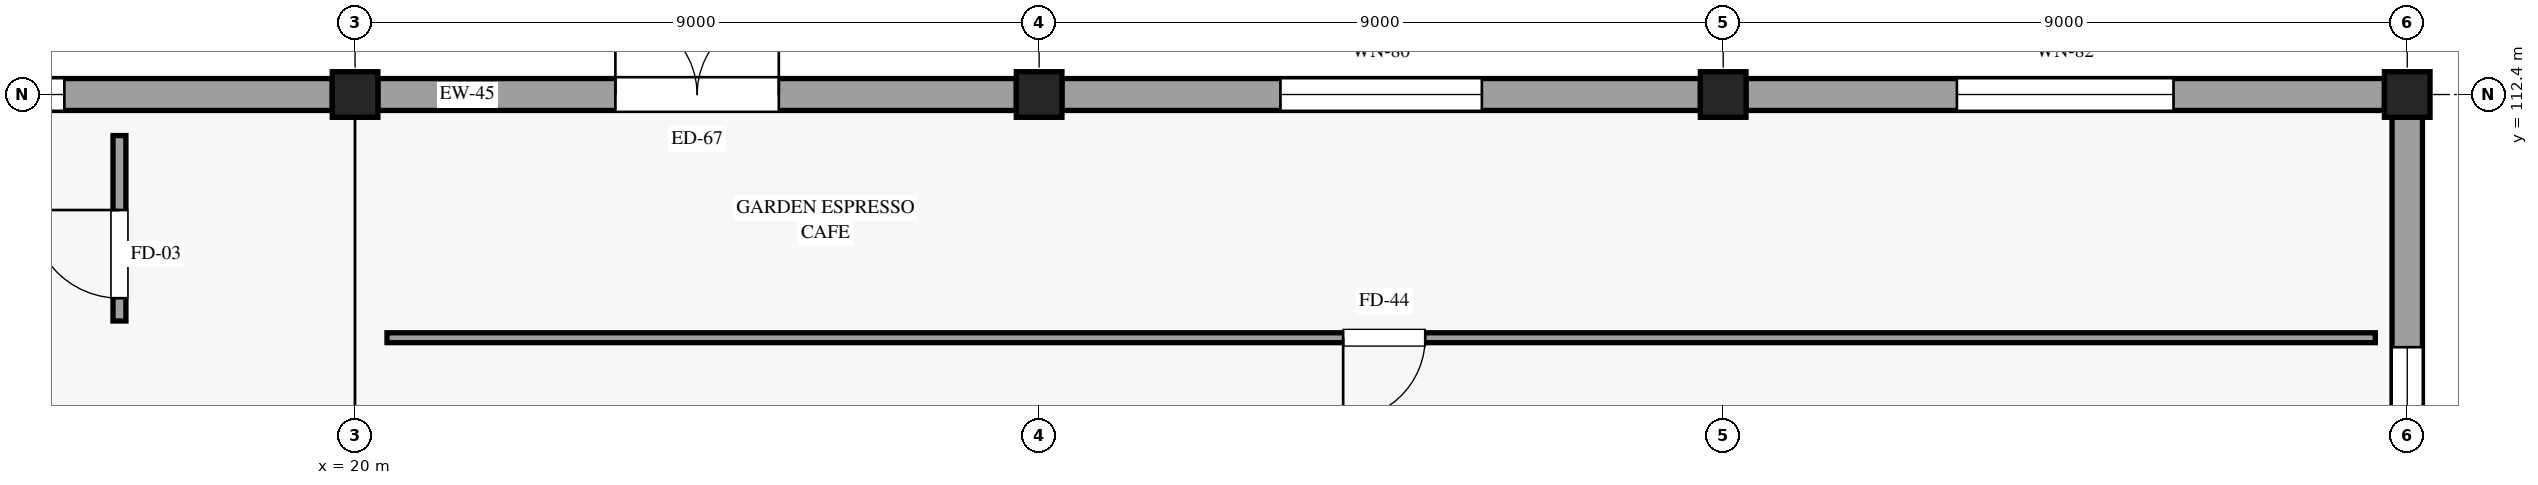
"""IFC4 building model, lengths in metres.
Left out: names, types, materials, properties, quantities, classifications, styles, units other than length and angle.
Written with IfcOpenShell. Run it as: python <this file> out.ifc"""

import sys

from ifc_helpers import new_model, si_unit, direction, frame, frame_2d, origin, origin_2d, place, context, subcontext, project, spatial, rectangle, extrude, element, fill, save


model = new_model("IFC4")
c1 = context("Model", 3, precision=1e-05, world=origin(), true_north=direction((0.0, 1.0)))
c2 = subcontext(c1, "Body", "Model", "MODEL_VIEW")
j1 = project(units=[si_unit("LENGTHUNIT", "METRE"), si_unit("PLANEANGLEUNIT", "RADIAN")], contexts=[c1])
p1 = place(None, origin())
s1 = spatial("IfcSite", under=j1, at=p1, CompositionType="ELEMENT")
p2 = place(p1, origin())
s2 = spatial("IfcBuilding", under=s1, at=p2, CompositionType="ELEMENT")
p3 = place(p2, origin())
s3 = spatial("IfcBuildingStorey", under=s2, at=p3, CompositionType="ELEMENT", Elevation=0.0)
for number, where, z_axis, x_axis in (
    (1, (20.0, 112.4, 0.0), (0.0, 0.0, 1.0), (1.0, 0.0, 0.0)),
    (2, (29.0, 112.4, 0.0), (0.0, 0.0, 1.0), (1.0, 0.0, 0.0)),
    (3, (38.0, 112.4, 0.0), (0.0, 0.0, 1.0), (1.0, 0.0, 0.0)),
    (4, (47.0, 112.4, 0.0), (0.0, 0.0, 1.0), (1.0, 0.0, 0.0)),
):
    element("IfcColumn", number, at=place(p3, frame(where, z_axis=z_axis, x_axis=x_axis)), inside=s3, PredefinedType="COLUMN", context=c2, shape_type="SweptSolid", body=[
        extrude(rectangle(XDim=0.6, YDim=0.6, at=origin_2d()), origin(), (0.0, 0.0, 1.0), 5.4),
    ])
p4 = place(p3, frame((11.3, 112.4, 0.0), z_axis=(0.0, 0.0, 1.0), x_axis=(1.0, 0.0, 0.0)))
e5 = element("IfcWall", 5, at=p4, inside=s3, PredefinedType="STANDARD", context=c2, shape_type="SweptSolid", body=[
    extrude(rectangle(XDim=8.4, YDim=0.42, at=frame_2d((4.2, 0.0))), origin(), (0.0, 0.0, 1.0), 4.605),
])
p5 = place(p4, frame((3.525, 0.0, 0.85)))
e6 = element("IfcOpeningElement", 6, at=p5, cuts=e5, PredefinedType="OPENING", context=c2, shape_type="SweptSolid", body=[
    extrude(rectangle(XDim=1.35, YDim=1.75, at=frame_2d((0.675, 0.875))), frame((0.0, 0.22, 0.0), z_axis=(0.0, -1.0, 0.0), x_axis=(1.0, 0.0, 0.0)), (0.0, 0.0, 1.0), 0.44),
])
p6 = place(p3, frame((20.3, 112.4, 0.0), z_axis=(0.0, 0.0, 1.0), x_axis=(1.0, 0.0, 0.0)))
e7 = element("IfcWall", 7, at=p6, inside=s3, PredefinedType="STANDARD", context=c2, shape_type="SweptSolid", body=[
    extrude(rectangle(XDim=8.4, YDim=0.42, at=frame_2d((4.2, 0.0))), origin(), (0.0, 0.0, 1.0), 4.605),
])
p7 = place(p6, frame((3.125, 0.0, 0.0)))
e8 = element("IfcOpeningElement", 8, at=p7, cuts=e7, PredefinedType="OPENING", context=c2, shape_type="SweptSolid", body=[
    extrude(rectangle(XDim=2.15, YDim=2.45, at=frame_2d((1.075, 1.225))), frame((0.0, 0.22, 0.0), z_axis=(0.0, -1.0, 0.0), x_axis=(1.0, 0.0, 0.0)), (0.0, 0.0, 1.0), 0.44),
])
p8 = place(p3, frame((29.3, 112.4, 0.0), z_axis=(0.0, 0.0, 1.0), x_axis=(1.0, 0.0, 0.0)))
e9 = element("IfcWall", 9, at=p8, inside=s3, PredefinedType="STANDARD", context=c2, shape_type="SweptSolid", body=[
    extrude(rectangle(XDim=8.4, YDim=0.42, at=frame_2d((4.2, 0.0))), origin(), (0.0, 0.0, 1.0), 4.605),
])
p9 = place(p8, frame((2.875, 0.0, 0.85)))
e10 = element("IfcOpeningElement", 10, at=p9, cuts=e9, PredefinedType="OPENING", context=c2, shape_type="SweptSolid", body=[
    extrude(rectangle(XDim=2.65, YDim=2.45, at=frame_2d((1.325, 1.225))), frame((0.0, 0.22, 0.0), z_axis=(0.0, -1.0, 0.0), x_axis=(1.0, 0.0, 0.0)), (0.0, 0.0, 1.0), 0.44),
])
p10 = place(p3, frame((38.3, 112.4, 0.0), z_axis=(0.0, 0.0, 1.0), x_axis=(1.0, 0.0, 0.0)))
e11 = element("IfcWall", 11, at=p10, inside=s3, PredefinedType="STANDARD", context=c2, shape_type="SweptSolid", body=[
    extrude(rectangle(XDim=8.4, YDim=0.42, at=frame_2d((4.2, 0.0))), origin(), (0.0, 0.0, 1.0), 4.605),
])
p11 = place(p10, frame((2.775, 0.0, 0.85)))
e12 = element("IfcOpeningElement", 12, at=p11, cuts=e11, PredefinedType="OPENING", context=c2, shape_type="SweptSolid", body=[
    extrude(rectangle(XDim=2.85, YDim=2.5, at=frame_2d((1.425, 1.25))), frame((0.0, 0.22, 0.0), z_axis=(0.0, -1.0, 0.0), x_axis=(1.0, 0.0, 0.0)), (0.0, 0.0, 1.0), 0.44),
])
p12 = place(p3, frame((47.0, 103.1, 0.0), z_axis=(0.0, 0.0, 1.0), x_axis=(0.0, 1.0, 0.0)))
e13 = element("IfcWall", 13, at=p12, inside=s3, PredefinedType="STANDARD", context=c2, shape_type="SweptSolid", body=[
    extrude(rectangle(XDim=9.0, YDim=0.4, at=frame_2d((4.5, 0.0))), origin(), (0.0, 0.0, 1.0), 4.605),
])
p13 = place(p12, frame((5.975, 0.0, 0.85), z_axis=(0.0, 0.0, 1.0), x_axis=(-1.0, 0.0, 0.0)))
e14 = element("IfcOpeningElement", 14, at=p13, cuts=e13, PredefinedType="OPENING", context=c2, shape_type="SweptSolid", body=[
    extrude(rectangle(XDim=2.95, YDim=2.5, at=frame_2d((1.475, 1.25))), frame((0.0, 0.21, 0.0), z_axis=(0.0, -1.0, 0.0), x_axis=(1.0, 0.0, 0.0)), (0.0, 0.0, 1.0), 0.42),
])
p14 = place(p3, frame((20.42, 109.2, 0.0), z_axis=(0.0, 0.0, 1.0), x_axis=(1.0, 0.0, 0.0)))
e15 = element("IfcWall", 15, at=p14, inside=s3, PredefinedType="PARTITIONING", context=c2, shape_type="SweptSolid", body=[
    extrude(rectangle(XDim=26.16, YDim=0.13, at=frame_2d((13.08, 0.0))), origin(), (0.0, 0.0, 1.0), 4.605),
])
p15 = place(p14, frame((13.66, 0.0, 0.0), z_axis=(0.0, 0.0, 1.0), x_axis=(-1.0, 0.0, 0.0)))
e16 = element("IfcOpeningElement", 16, at=p15, cuts=e15, PredefinedType="OPENING", context=c2, shape_type="SweptSolid", body=[
    extrude(rectangle(XDim=1.08, YDim=2.24, at=frame_2d((0.54, 1.12))), frame((0.0, 0.075, 0.0), z_axis=(0.0, -1.0, 0.0), x_axis=(1.0, 0.0, 0.0)), (0.0, 0.0, 1.0), 0.15),
])
p16 = place(p3, frame((16.9, 109.42, 0.0), z_axis=(0.0, 0.0, 1.0), x_axis=(0.0, 1.0, 0.0)))
e17 = element("IfcWall", 17, at=p16, inside=s3, PredefinedType="PARTITIONING", context=c2, shape_type="SweptSolid", body=[
    extrude(rectangle(XDim=2.44, YDim=0.17, at=frame_2d((1.22, 0.0))), origin(), (0.0, 0.0, 1.0), 4.745),
])
p17 = place(p16, frame((0.3, 0.0, 0.0)))
e18 = element("IfcOpeningElement", 18, at=p17, cuts=e17, PredefinedType="OPENING", context=c2, shape_type="SweptSolid", body=[
    extrude(rectangle(XDim=1.16, YDim=2.28, at=frame_2d((0.58, 1.14))), frame((0.0, 0.095, 0.0), z_axis=(0.0, -1.0, 0.0), x_axis=(1.0, 0.0, 0.0)), (0.0, 0.0, 1.0), 0.19),
])
p18 = place(p5, origin())
e19 = element("IfcWindow", 19, at=p18, inside=s3, PartitioningType="SINGLE_PANEL", PredefinedType="WINDOW", context=c2, shape_type="SweptSolid", body=[
    extrude(rectangle(XDim=1.35, YDim=1.75, at=frame_2d((0.675, 0.875))), frame((0.0, 0.03, 0.0), z_axis=(0.0, -1.0, 0.0), x_axis=(1.0, 0.0, 0.0)), (0.0, 0.0, 1.0), 0.06),
])
fill(e6, e19)
p19 = place(p7, origin())
e20 = element("IfcDoor", 20, at=p19, inside=s3, OperationType="DOUBLE_DOOR_SINGLE_SWING", PredefinedType="DOOR", context=c2, shape_type="SweptSolid", body=[
    extrude(rectangle(XDim=2.15, YDim=2.45, at=frame_2d((1.075, 1.225))), frame((0.0, 0.025, 0.0), z_axis=(0.0, -1.0, 0.0), x_axis=(1.0, 0.0, 0.0)), (0.0, 0.0, 1.0), 0.05),
])
fill(e8, e20)
p20 = place(p9, origin())
e21 = element("IfcWindow", 21, at=p20, inside=s3, PartitioningType="SINGLE_PANEL", PredefinedType="WINDOW", context=c2, shape_type="SweptSolid", body=[
    extrude(rectangle(XDim=2.65, YDim=2.45, at=frame_2d((1.325, 1.225))), frame((0.0, 0.03, 0.0), z_axis=(0.0, -1.0, 0.0), x_axis=(1.0, 0.0, 0.0)), (0.0, 0.0, 1.0), 0.06),
])
fill(e10, e21)
p21 = place(p11, origin())
e22 = element("IfcWindow", 22, at=p21, inside=s3, PartitioningType="SINGLE_PANEL", PredefinedType="WINDOW", context=c2, shape_type="SweptSolid", body=[
    extrude(rectangle(XDim=2.85, YDim=2.5, at=frame_2d((1.425, 1.25))), frame((0.0, 0.03, 0.0), z_axis=(0.0, -1.0, 0.0), x_axis=(1.0, 0.0, 0.0)), (0.0, 0.0, 1.0), 0.06),
])
fill(e12, e22)
p22 = place(p13, origin())
e23 = element("IfcWindow", 23, at=p22, inside=s3, PartitioningType="SINGLE_PANEL", PredefinedType="WINDOW", context=c2, shape_type="SweptSolid", body=[
    extrude(rectangle(XDim=2.95, YDim=2.5, at=frame_2d((1.475, 1.25))), frame((0.0, 0.03, 0.0), z_axis=(0.0, -1.0, 0.0), x_axis=(1.0, 0.0, 0.0)), (0.0, 0.0, 1.0), 0.06),
])
fill(e14, e23)
p23 = place(p15, origin())
e24 = element("IfcDoor", 24, at=p23, inside=s3, OperationType="SINGLE_SWING_RIGHT", PredefinedType="DOOR", context=c2, shape_type="SweptSolid", body=[
    extrude(rectangle(XDim=1.08, YDim=2.24, at=frame_2d((0.54, 1.12))), frame((0.0, 0.025, 0.0), z_axis=(0.0, -1.0, 0.0), x_axis=(1.0, 0.0, 0.0)), (0.0, 0.0, 1.0), 0.05),
])
fill(e16, e24)
p24 = place(p17, origin())
e25 = element("IfcDoor", 25, at=p24, inside=s3, OperationType="SINGLE_SWING_RIGHT", PredefinedType="DOOR", context=c2, shape_type="SweptSolid", body=[
    extrude(rectangle(XDim=1.16, YDim=2.28, at=frame_2d((0.58, 1.14))), frame((0.0, 0.025, 0.0), z_axis=(0.0, -1.0, 0.0), x_axis=(1.0, 0.0, 0.0)), (0.0, 0.0, 1.0), 0.05),
])
fill(e18, e25)
save(model, sys.argv[1])
